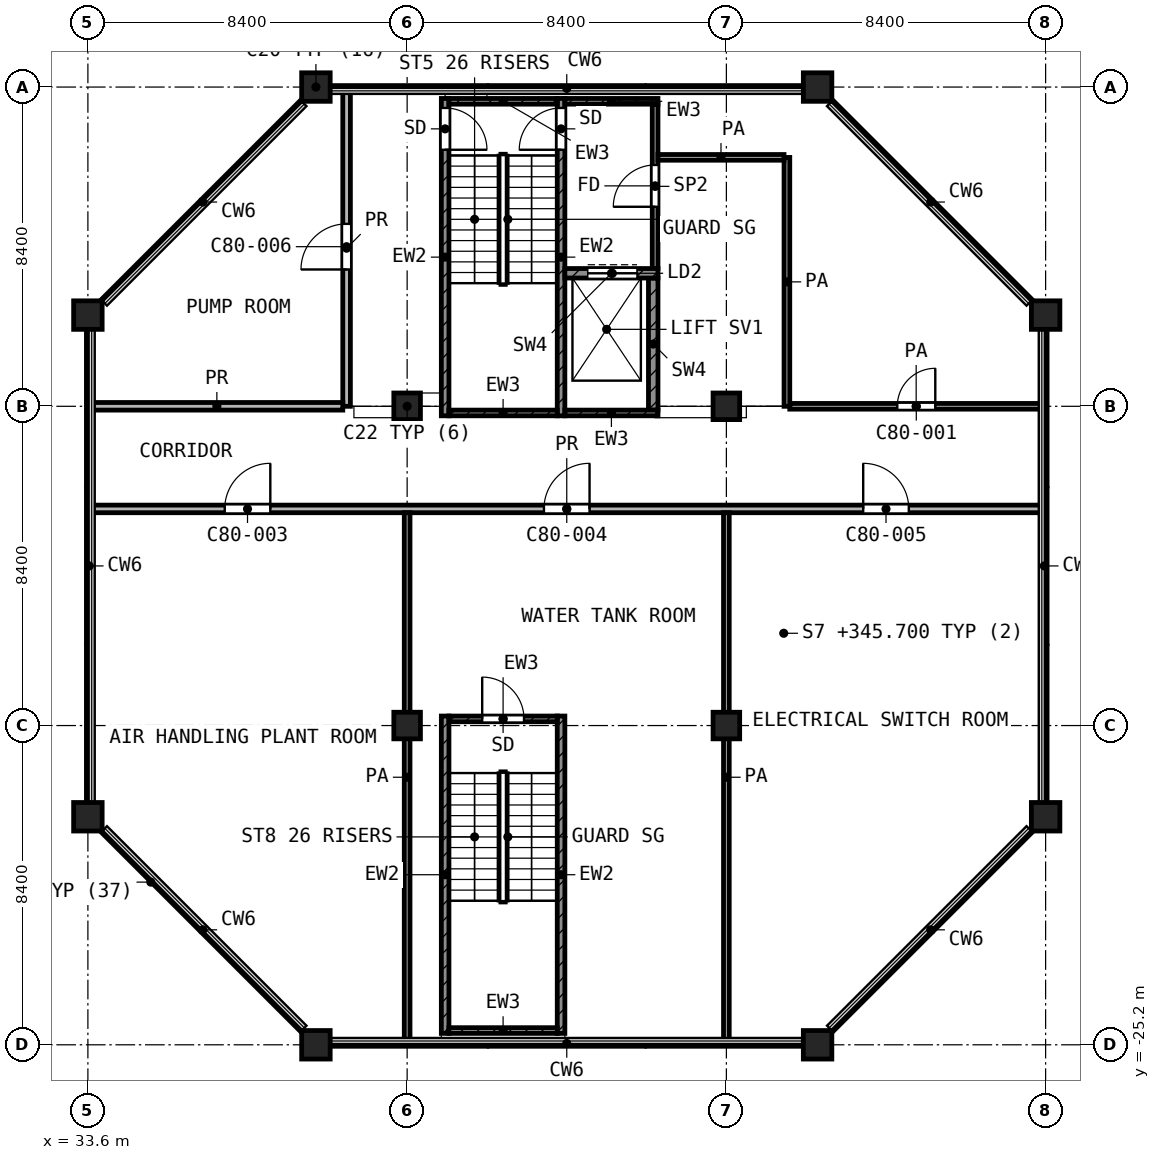
"""IFC4 building model, lengths in metres.
Left out: names, types, materials, properties, quantities, classifications, styles, units other than length and angle.
Written with IfcOpenShell. Run it as: python <this file> out.ifc"""

import sys

from ifc_helpers import new_model, si_unit, direction, frame, frame_2d, origin, origin_2d, place, context, subcontext, project, spatial, rectangle, extrude, element, fill, save


model = new_model("IFC4")
c1 = context("Model", 3, precision=1e-05, world=origin(), true_north=direction((0.0, 1.0)))
c2 = subcontext(c1, "Body", "Model", "MODEL_VIEW")
j1 = project(units=[si_unit("LENGTHUNIT", "METRE"), si_unit("PLANEANGLEUNIT", "RADIAN")], contexts=[c1])
p1 = place(None, origin())
s1 = spatial("IfcSite", under=j1, at=p1, CompositionType="ELEMENT")
p2 = place(p1, origin())
s2 = spatial("IfcBuilding", under=s1, at=p2, CompositionType="ELEMENT")
p3 = place(p2, frame((0.0, 0.0, 345.7)))
s3 = spatial("IfcBuildingStorey", under=s2, at=p3, CompositionType="ELEMENT", Elevation=345.7)
for number, where, z_axis, x_axis in (
    (1, (39.6, 0.0, 0.0), (0.0, 0.0, 1.0), (1.0, 0.0, 0.0)),
    (2, (52.8, 0.0, 0.0), (0.0, 0.0, 1.0), (1.0, 0.0, 0.0)),
    (3, (33.6, -6.0, 0.0), (0.0, 0.0, 1.0), (1.0, 0.0, 0.0)),
    (4, (58.8, -6.0, 0.0), (0.0, 0.0, 1.0), (1.0, 0.0, 0.0)),
):
    element("IfcColumn", number, at=place(p3, frame(where, z_axis=z_axis, x_axis=x_axis)), inside=s3, PredefinedType="COLUMN", context=c2, shape_type="SweptSolid", body=[
        extrude(rectangle(XDim=0.75, YDim=0.75, at=origin_2d()), origin(), (0.0, 0.0, 1.0), 4.5),
    ])
for number, where, z_axis, x_axis in (
    (5, (42.0, -8.4, 0.0), (0.0, 0.0, 1.0), (1.0, 0.0, 0.0)),
    (6, (50.4, -8.4, 0.0), (0.0, 0.0, 1.0), (1.0, 0.0, 0.0)),
    (7, (42.0, -16.8, 0.0), (0.0, 0.0, 1.0), (1.0, 0.0, 0.0)),
    (8, (50.4, -16.8, 0.0), (0.0, 0.0, 1.0), (1.0, 0.0, 0.0)),
):
    element("IfcColumn", number, at=place(p3, frame(where, z_axis=z_axis, x_axis=x_axis)), inside=s3, PredefinedType="COLUMN", context=c2, shape_type="SweptSolid", body=[
        extrude(rectangle(XDim=0.7, YDim=0.7, at=origin_2d()), origin(), (0.0, 0.0, 1.0), 4.5),
    ])
for number, where, z_axis, x_axis in (
    (9, (33.6, -19.2, 0.0), (0.0, 0.0, 1.0), (1.0, 0.0, 0.0)),
    (10, (58.8, -19.2, 0.0), (0.0, 0.0, 1.0), (1.0, 0.0, 0.0)),
    (11, (39.6, -25.2, 0.0), (0.0, 0.0, 1.0), (1.0, 0.0, 0.0)),
    (12, (52.8, -25.2, 0.0), (0.0, 0.0, 1.0), (1.0, 0.0, 0.0)),
):
    element("IfcColumn", number, at=place(p3, frame(where, z_axis=z_axis, x_axis=x_axis)), inside=s3, PredefinedType="COLUMN", context=c2, shape_type="SweptSolid", body=[
        extrude(rectangle(XDim=0.75, YDim=0.75, at=origin_2d()), origin(), (0.0, 0.0, 1.0), 4.5),
    ])
p4 = place(p3, frame((43.0, -8.65, 0.0), z_axis=(0.0, 0.0, 1.0), x_axis=(0.0, 1.0, 0.0)))
e13 = element("IfcWall", 13, at=p4, inside=s3, PredefinedType="SHEAR", context=c2, shape_type="SweptSolid", body=[
    extrude(rectangle(XDim=8.35, YDim=0.2, at=frame_2d((4.175, 0.0))), origin(), (0.0, 0.0, 1.0), 4.2),
])
p5 = place(p4, frame((7.0, 0.0, 0.0)))
e14 = element("IfcOpeningElement", 14, at=p5, cuts=e13, PredefinedType="OPENING", context=c2, shape_type="SweptSolid", body=[
    extrude(rectangle(XDim=1.1, YDim=2.1, at=frame_2d((0.55, 1.05))), frame((0.0, 0.11, 0.0), z_axis=(0.0, -1.0, 0.0), x_axis=(1.0, 0.0, 0.0)), (0.0, 0.0, 1.0), 0.22),
])
p6 = place(p3, frame((46.05, -8.65, 0.0), z_axis=(0.0, 0.0, 1.0), x_axis=(0.0, 1.0, 0.0)))
e15 = element("IfcWall", 15, at=p6, inside=s3, PredefinedType="SHEAR", context=c2, shape_type="SweptSolid", body=[
    extrude(rectangle(XDim=8.35, YDim=0.2, at=frame_2d((4.175, 0.0))), origin(), (0.0, 0.0, 1.0), 4.2),
])
p7 = place(p6, frame((7.0, 0.0, 0.0)))
e16 = element("IfcOpeningElement", 16, at=p7, cuts=e15, PredefinedType="OPENING", context=c2, shape_type="SweptSolid", body=[
    extrude(rectangle(XDim=1.1, YDim=2.1, at=frame_2d((0.55, 1.05))), frame((0.0, 0.11, 0.0), z_axis=(0.0, -1.0, 0.0), x_axis=(1.0, 0.0, 0.0)), (0.0, 0.0, 1.0), 0.22),
])
p8 = place(p3, frame((43.1, -0.375, 0.0), z_axis=(0.0, 0.0, 1.0), x_axis=(1.0, 0.0, 0.0)))
e17 = element("IfcWall", 17, at=p8, inside=s3, PredefinedType="SHEAR", context=c2, shape_type="SweptSolid", body=[
    extrude(rectangle(XDim=2.85, YDim=0.15, at=frame_2d((1.425, 0.0))), origin(), (0.0, 0.0, 1.0), 4.2),
])
p9 = place(p3, frame((46.15, -0.375, 0.0), z_axis=(0.0, 0.0, 1.0), x_axis=(1.0, 0.0, 0.0)))
e18 = element("IfcWall", 18, at=p9, inside=s3, PredefinedType="SHEAR", context=c2, shape_type="SweptSolid", body=[
    extrude(rectangle(XDim=2.45, YDim=0.15, at=frame_2d((1.225, 0.0))), origin(), (0.0, 0.0, 1.0), 4.2),
])
p10 = place(p3, frame((43.1, -8.575, 0.0), z_axis=(0.0, 0.0, 1.0), x_axis=(1.0, 0.0, 0.0)))
e19 = element("IfcWall", 19, at=p10, inside=s3, PredefinedType="SHEAR", context=c2, shape_type="SweptSolid", body=[
    extrude(rectangle(XDim=2.85, YDim=0.15, at=frame_2d((1.425, 0.0))), origin(), (0.0, 0.0, 1.0), 4.2),
])
p11 = place(p3, frame((46.15, -8.575, 0.0), z_axis=(0.0, 0.0, 1.0), x_axis=(1.0, 0.0, 0.0)))
e20 = element("IfcWall", 20, at=p11, inside=s3, PredefinedType="SHEAR", context=c2, shape_type="SweptSolid", body=[
    extrude(rectangle(XDim=2.45, YDim=0.15, at=frame_2d((1.225, 0.0))), origin(), (0.0, 0.0, 1.0), 4.2),
])
p12 = place(p3, frame((46.15, -4.9, 0.0), z_axis=(0.0, 0.0, 1.0), x_axis=(1.0, 0.0, 0.0)))
e21 = element("IfcWall", 21, at=p12, inside=s3, PredefinedType="SHEAR", context=c2, shape_type="SweptSolid", body=[
    extrude(rectangle(XDim=2.45, YDim=0.25, at=frame_2d((1.225, 0.0))), origin(), (0.0, 0.0, 1.0), 4.2),
])
p13 = place(p12, frame((0.6, 0.0, 0.0)))
e22 = element("IfcOpeningElement", 22, at=p13, cuts=e21, PredefinedType="OPENING", context=c2, shape_type="SweptSolid", body=[
    extrude(rectangle(XDim=1.3, YDim=2.1, at=frame_2d((0.65, 1.05))), frame((0.0, 0.135, 0.0), z_axis=(0.0, -1.0, 0.0), x_axis=(1.0, 0.0, 0.0)), (0.0, 0.0, 1.0), 0.27),
])
p14 = place(p3, frame((48.475, -8.5, 0.0), z_axis=(0.0, 0.0, 1.0), x_axis=(0.0, 1.0, 0.0)))
e23 = element("IfcWall", 23, at=p14, inside=s3, PredefinedType="SHEAR", context=c2, shape_type="SweptSolid", body=[
    extrude(rectangle(XDim=3.475, YDim=0.25, at=frame_2d((1.738, 0.0))), origin(), (0.0, 0.0, 1.0), 4.2),
])
p15 = place(p3, frame((48.525, -4.775, 0.0), z_axis=(0.0, 0.0, 1.0), x_axis=(0.0, 1.0, 0.0)))
e24 = element("IfcWall", 24, at=p15, inside=s3, PredefinedType="PARTITIONING", context=c2, shape_type="SweptSolid", body=[
    extrude(rectangle(XDim=4.325, YDim=0.15, at=frame_2d((2.163, 0.0))), origin(), (0.0, 0.0, 1.0), 4.2),
])
p16 = place(p15, frame((1.625, 0.0, 0.0)))
e25 = element("IfcOpeningElement", 25, at=p16, cuts=e24, PredefinedType="OPENING", context=c2, shape_type="SweptSolid", body=[
    extrude(rectangle(XDim=1.1, YDim=2.1, at=frame_2d((0.55, 1.05))), frame((0.0, 0.085, 0.0), z_axis=(0.0, -1.0, 0.0), x_axis=(1.0, 0.0, 0.0)), (0.0, 0.0, 1.0), 0.17),
])
for number, where, z_axis, x_axis in (
    (26, (43.0, -24.9, 0.0), (0.0, 0.0, 1.0), (0.0, 1.0, 0.0)),
    (27, (46.05, -24.9, 0.0), (0.0, 0.0, 1.0), (0.0, 1.0, 0.0)),
):
    element("IfcWall", number, at=place(p3, frame(where, z_axis=z_axis, x_axis=x_axis)), inside=s3, PredefinedType="SHEAR", context=c2, shape_type="SweptSolid", body=[
        extrude(rectangle(XDim=8.35, YDim=0.2, at=frame_2d((4.175, 0.0))), origin(), (0.0, 0.0, 1.0), 4.2),
    ])
p17 = place(p3, frame((43.1, -16.625, 0.0), z_axis=(0.0, 0.0, 1.0), x_axis=(1.0, 0.0, 0.0)))
e28 = element("IfcWall", 28, at=p17, inside=s3, PredefinedType="SHEAR", context=c2, shape_type="SweptSolid", body=[
    extrude(rectangle(XDim=2.85, YDim=0.15, at=frame_2d((1.425, 0.0))), origin(), (0.0, 0.0, 1.0), 4.2),
])
p18 = place(p17, frame((0.875, 0.0, 0.0)))
e29 = element("IfcOpeningElement", 29, at=p18, cuts=e28, PredefinedType="OPENING", context=c2, shape_type="SweptSolid", body=[
    extrude(rectangle(XDim=1.1, YDim=2.1, at=frame_2d((0.55, 1.05))), frame((0.0, 0.085, 0.0), z_axis=(0.0, -1.0, 0.0), x_axis=(1.0, 0.0, 0.0)), (0.0, 0.0, 1.0), 0.17),
])
p19 = place(p3, frame((43.1, -24.825, 0.0), z_axis=(0.0, 0.0, 1.0), x_axis=(1.0, 0.0, 0.0)))
e30 = element("IfcWall", 30, at=p19, inside=s3, PredefinedType="SHEAR", context=c2, shape_type="SweptSolid", body=[
    extrude(rectangle(XDim=2.85, YDim=0.15, at=frame_2d((1.425, 0.0))), origin(), (0.0, 0.0, 1.0), 4.2),
])
p20 = place(p3, frame((52.068, -8.4, 0.0), z_axis=(0.0, 0.0, 1.0), x_axis=(1.0, 0.0, 0.0)))
e31 = element("IfcWall", 31, at=p20, inside=s3, PredefinedType="PARTITIONING", context=c2, shape_type="SweptSolid", body=[
    extrude(rectangle(XDim=6.652, YDim=0.15, at=frame_2d((3.326, 0.0))), origin(), (0.0, 0.0, 1.0), 4.2),
])
p21 = place(p20, frame((2.829, 0.0, 0.0)))
e32 = element("IfcOpeningElement", 32, at=p21, cuts=e31, PredefinedType="OPENING", context=c2, shape_type="SweptSolid", body=[
    extrude(rectangle(XDim=1.0, YDim=2.1, at=frame_2d((0.5, 1.05))), frame((0.0, 0.085, 0.0), z_axis=(0.0, -1.0, 0.0), x_axis=(1.0, 0.0, 0.0)), (0.0, 0.0, 1.0), 0.17),
])
p22 = place(p3, frame((48.6, -1.85, 0.0), z_axis=(0.0, 0.0, 1.0), x_axis=(1.0, 0.0, 0.0)))
e33 = element("IfcWall", 33, at=p22, inside=s3, PredefinedType="PARTITIONING", context=c2, shape_type="SweptSolid", body=[
    extrude(rectangle(XDim=3.316, YDim=0.15, at=frame_2d((1.658, 0.0))), origin(), (0.0, 0.0, 1.0), 4.2),
])
for number, where, z_axis, x_axis in (
    (34, (42.0, -25.12, 0.0), (0.0, 0.0, 1.0), (0.0, 1.0, 0.0)),
    (35, (50.4, -25.12, 0.0), (0.0, 0.0, 1.0), (0.0, 1.0, 0.0)),
):
    element("IfcWall", number, at=place(p3, frame(where, z_axis=z_axis, x_axis=x_axis)), inside=s3, PredefinedType="PARTITIONING", context=c2, shape_type="SweptSolid", body=[
        extrude(rectangle(XDim=13.92, YDim=0.15, at=frame_2d((6.96, 0.0))), origin(), (0.0, 0.0, 1.0), 4.2),
    ])
p23 = place(p3, frame((51.993, -8.4, 0.0), z_axis=(0.0, 0.0, 1.0), x_axis=(0.0, 1.0, 0.0)))
e36 = element("IfcWall", 36, at=p23, inside=s3, PredefinedType="PARTITIONING", context=c2, shape_type="SweptSolid", body=[
    extrude(rectangle(XDim=6.548, YDim=0.15, at=frame_2d((3.274, 0.0))), origin(), (0.0, 0.0, 1.0), 4.2),
])
p24 = place(p3, frame((33.68, -11.1, 0.0), z_axis=(0.0, 0.0, 1.0), x_axis=(1.0, 0.0, 0.0)))
e37 = element("IfcWall", 37, at=p24, inside=s3, PredefinedType="PARTITIONING", context=c2, shape_type="SweptSolid", body=[
    extrude(rectangle(XDim=25.04, YDim=0.2, at=frame_2d((12.52, 0.0))), origin(), (0.0, 0.0, 1.0), 4.2),
])
p25 = place(p24, frame((3.52, 0.0, 0.0)))
e38 = element("IfcOpeningElement", 38, at=p25, cuts=e37, PredefinedType="OPENING", context=c2, shape_type="SweptSolid", body=[
    extrude(rectangle(XDim=1.2, YDim=2.1, at=frame_2d((0.6, 1.05))), frame((0.0, 0.11, 0.0), z_axis=(0.0, -1.0, 0.0), x_axis=(1.0, 0.0, 0.0)), (0.0, 0.0, 1.0), 0.22),
])
p26 = place(p24, frame((11.92, 0.0, 0.0)))
e39 = element("IfcOpeningElement", 39, at=p26, cuts=e37, PredefinedType="OPENING", context=c2, shape_type="SweptSolid", body=[
    extrude(rectangle(XDim=1.2, YDim=2.1, at=frame_2d((0.6, 1.05))), frame((0.0, 0.11, 0.0), z_axis=(0.0, -1.0, 0.0), x_axis=(1.0, 0.0, 0.0)), (0.0, 0.0, 1.0), 0.22),
])
p27 = place(p24, frame((20.32, 0.0, 0.0)))
e40 = element("IfcOpeningElement", 40, at=p27, cuts=e37, PredefinedType="OPENING", context=c2, shape_type="SweptSolid", body=[
    extrude(rectangle(XDim=1.2, YDim=2.1, at=frame_2d((0.6, 1.05))), frame((0.0, 0.11, 0.0), z_axis=(0.0, -1.0, 0.0), x_axis=(1.0, 0.0, 0.0)), (0.0, 0.0, 1.0), 0.22),
])
p28 = place(p3, frame((33.68, -8.4, 0.0), z_axis=(0.0, 0.0, 1.0), x_axis=(1.0, 0.0, 0.0)))
e41 = element("IfcWall", 41, at=p28, inside=s3, PredefinedType="PARTITIONING", context=c2, shape_type="SweptSolid", body=[
    extrude(rectangle(XDim=6.627, YDim=0.2, at=frame_2d((3.313, 0.0))), origin(), (0.0, 0.0, 1.0), 4.2),
])
p29 = place(p3, frame((40.407, -8.4, 0.0), z_axis=(0.0, 0.0, 1.0), x_axis=(0.0, 1.0, 0.0)))
e42 = element("IfcWall", 42, at=p29, inside=s3, PredefinedType="PARTITIONING", context=c2, shape_type="SweptSolid", body=[
    extrude(rectangle(XDim=8.32, YDim=0.2, at=frame_2d((4.16, 0.0))), origin(), (0.0, 0.0, 1.0), 4.2),
])
p30 = place(p29, frame((3.6, 0.0, 0.0)))
e43 = element("IfcOpeningElement", 43, at=p30, cuts=e42, PredefinedType="OPENING", context=c2, shape_type="SweptSolid", body=[
    extrude(rectangle(XDim=1.2, YDim=2.1, at=frame_2d((0.6, 1.05))), frame((0.0, 0.11, 0.0), z_axis=(0.0, -1.0, 0.0), x_axis=(1.0, 0.0, 0.0)), (0.0, 0.0, 1.0), 0.22),
])
p31 = place(p5, frame((1.1, 0.0, 0.0), z_axis=(0.0, 0.0, 1.0), x_axis=(-1.0, 0.0, 0.0)))
e44 = element("IfcDoor", 44, at=p31, inside=s3, OperationType="SINGLE_SWING_LEFT", PredefinedType="DOOR", context=c2, shape_type="SweptSolid", body=[
    extrude(rectangle(XDim=1.1, YDim=2.1, at=frame_2d((0.55, 1.05))), frame((0.0, 0.025, 0.0), z_axis=(0.0, -1.0, 0.0), x_axis=(1.0, 0.0, 0.0)), (0.0, 0.0, 1.0), 0.05),
])
fill(e14, e44)
p32 = place(p7, origin())
e45 = element("IfcDoor", 45, at=p32, inside=s3, OperationType="SINGLE_SWING_LEFT", PredefinedType="DOOR", context=c2, shape_type="SweptSolid", body=[
    extrude(rectangle(XDim=1.1, YDim=2.1, at=frame_2d((0.55, 1.05))), frame((0.0, 0.025, 0.0), z_axis=(0.0, -1.0, 0.0), x_axis=(1.0, 0.0, 0.0)), (0.0, 0.0, 1.0), 0.05),
])
fill(e16, e45)
p33 = place(p13, origin())
e46 = element("IfcDoor", 46, at=p33, inside=s3, OperationType="DOUBLE_DOOR_SLIDING", PredefinedType="DOOR", context=c2, shape_type="SweptSolid", body=[
    extrude(rectangle(XDim=1.3, YDim=2.1, at=frame_2d((0.65, 1.05))), frame((0.0, 0.025, 0.0), z_axis=(0.0, -1.0, 0.0), x_axis=(1.0, 0.0, 0.0)), (0.0, 0.0, 1.0), 0.05),
])
fill(e22, e46)
p34 = place(p16, origin())
e47 = element("IfcDoor", 47, at=p34, inside=s3, OperationType="SINGLE_SWING_LEFT", PredefinedType="DOOR", context=c2, shape_type="SweptSolid", body=[
    extrude(rectangle(XDim=1.1, YDim=2.1, at=frame_2d((0.55, 1.05))), frame((0.0, 0.025, 0.0), z_axis=(0.0, -1.0, 0.0), x_axis=(1.0, 0.0, 0.0)), (0.0, 0.0, 1.0), 0.05),
])
fill(e25, e47)
p35 = place(p18, origin())
e48 = element("IfcDoor", 48, at=p35, inside=s3, OperationType="SINGLE_SWING_LEFT", PredefinedType="DOOR", context=c2, shape_type="SweptSolid", body=[
    extrude(rectangle(XDim=1.1, YDim=2.1, at=frame_2d((0.55, 1.05))), frame((0.0, 0.025, 0.0), z_axis=(0.0, -1.0, 0.0), x_axis=(1.0, 0.0, 0.0)), (0.0, 0.0, 1.0), 0.05),
])
fill(e29, e48)
p36 = place(p25, origin())
e49 = element("IfcDoor", 49, at=p36, inside=s3, OperationType="SINGLE_SWING_RIGHT", PredefinedType="DOOR", context=c2, shape_type="SweptSolid", body=[
    extrude(rectangle(XDim=1.2, YDim=2.1, at=frame_2d((0.6, 1.05))), frame((0.0, 0.025, 0.0), z_axis=(0.0, -1.0, 0.0), x_axis=(1.0, 0.0, 0.0)), (0.0, 0.0, 1.0), 0.05),
])
fill(e38, e49)
p37 = place(p26, origin())
e50 = element("IfcDoor", 50, at=p37, inside=s3, OperationType="SINGLE_SWING_RIGHT", PredefinedType="DOOR", context=c2, shape_type="SweptSolid", body=[
    extrude(rectangle(XDim=1.2, YDim=2.1, at=frame_2d((0.6, 1.05))), frame((0.0, 0.025, 0.0), z_axis=(0.0, -1.0, 0.0), x_axis=(1.0, 0.0, 0.0)), (0.0, 0.0, 1.0), 0.05),
])
fill(e39, e50)
p38 = place(p27, origin())
e51 = element("IfcDoor", 51, at=p38, inside=s3, OperationType="SINGLE_SWING_LEFT", PredefinedType="DOOR", context=c2, shape_type="SweptSolid", body=[
    extrude(rectangle(XDim=1.2, YDim=2.1, at=frame_2d((0.6, 1.05))), frame((0.0, 0.025, 0.0), z_axis=(0.0, -1.0, 0.0), x_axis=(1.0, 0.0, 0.0)), (0.0, 0.0, 1.0), 0.05),
])
fill(e40, e51)
p39 = place(p30, origin())
e52 = element("IfcDoor", 52, at=p39, inside=s3, OperationType="SINGLE_SWING_LEFT", PredefinedType="DOOR", context=c2, shape_type="SweptSolid", body=[
    extrude(rectangle(XDim=1.2, YDim=2.1, at=frame_2d((0.6, 1.05))), frame((0.0, 0.025, 0.0), z_axis=(0.0, -1.0, 0.0), x_axis=(1.0, 0.0, 0.0)), (0.0, 0.0, 1.0), 0.05),
])
fill(e43, e52)
p40 = place(p21, origin())
e53 = element("IfcDoor", 53, at=p40, inside=s3, OperationType="SINGLE_SWING_RIGHT", PredefinedType="DOOR", context=c2, shape_type="SweptSolid", body=[
    extrude(rectangle(XDim=1.0, YDim=2.1, at=frame_2d((0.5, 1.05))), frame((0.0, 0.025, 0.0), z_axis=(0.0, -1.0, 0.0), x_axis=(1.0, 0.0, 0.0)), (0.0, 0.0, 1.0), 0.05),
])
fill(e32, e53)
save(model, sys.argv[1])
